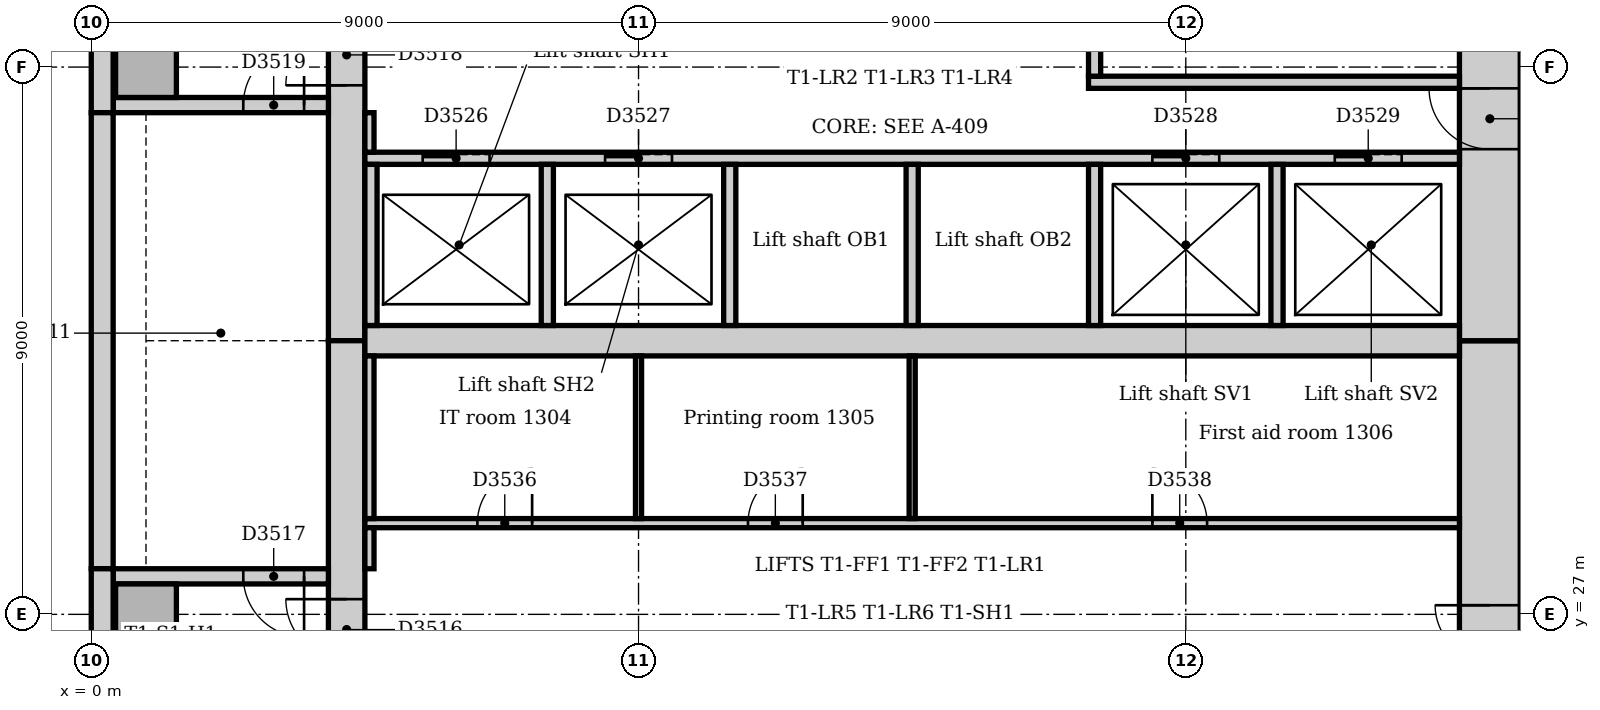
"""IFC4 building model, lengths in metres.
Left out: names, types, materials, properties, quantities, classifications, styles, units other than length and angle.
Written with IfcOpenShell. Run it as: python <this file> out.ifc"""

import sys

from ifc_helpers import new_model, si_unit, direction, frame, frame_2d, origin, origin_2d, place, context, subcontext, project, spatial, rectangle, extrude, element, fill, save


model = new_model("IFC4")
c1 = context("Model", 3, precision=1e-05, world=origin(), true_north=direction((0.0, 1.0)))
c2 = subcontext(c1, "Body", "Model", "MODEL_VIEW")
j1 = project(units=[si_unit("LENGTHUNIT", "METRE"), si_unit("PLANEANGLEUNIT", "RADIAN")], contexts=[c1])
p1 = place(None, origin())
s1 = spatial("IfcSite", under=j1, at=p1, CompositionType="ELEMENT")
p2 = place(p1, origin())
s2 = spatial("IfcBuilding", under=s1, at=p2, CompositionType="ELEMENT")
p3 = place(p2, frame((0.0, 0.0, 59.0)))
s3 = spatial("IfcBuildingStorey", under=s2, at=p3, CompositionType="ELEMENT", Elevation=59.0)
p4 = place(p3, frame((23.0, 21.0, 0.0), z_axis=(0.0, 0.0, 1.0), x_axis=(0.0, 1.0, 0.0)))
e1 = element("IfcWall", 1, at=p4, inside=s3, PredefinedType="SOLIDWALL", context=c2, shape_type="SweptSolid", body=[
    extrude(rectangle(XDim=10.5, YDim=1.0, at=frame_2d((5.25, 0.0))), origin(), (0.0, 0.0, 1.0), 4.0),
])
p5 = place(p4, frame((4.35, 0.0, 0.0)))
e2 = element("IfcOpeningElement", 2, at=p5, cuts=e1, PredefinedType="OPENING", context=c2, shape_type="SweptSolid", body=[
    extrude(rectangle(XDim=1.8, YDim=2.1, at=frame_2d((0.9, 1.05))), frame((0.0, 0.51, 0.0), z_axis=(0.0, -1.0, 0.0), x_axis=(1.0, 0.0, 0.0)), (0.0, 0.0, 1.0), 1.02),
])
p6 = place(p3, frame((23.0, 31.5, 0.0), z_axis=(0.0, 0.0, 1.0), x_axis=(0.0, 1.0, 0.0)))
e3 = element("IfcWall", 3, at=p6, inside=s3, PredefinedType="SOLIDWALL", context=c2, shape_type="SweptSolid", body=[
    extrude(rectangle(XDim=10.5, YDim=1.0, at=frame_2d((5.25, 0.0))), origin(), (0.0, 0.0, 1.0), 4.0),
])
p7 = place(p6, frame((3.15, 0.0, 0.0)))
e4 = element("IfcOpeningElement", 4, at=p7, cuts=e3, PredefinedType="OPENING", context=c2, shape_type="SweptSolid", body=[
    extrude(rectangle(XDim=1.0, YDim=2.1, at=frame_2d((0.5, 1.05))), frame((0.0, 0.51, 0.0), z_axis=(0.0, -1.0, 0.0), x_axis=(1.0, 0.0, 0.0)), (0.0, 0.0, 1.0), 1.02),
])
p8 = place(p6, frame((5.2, 0.0, 0.0)))
e5 = element("IfcOpeningElement", 5, at=p8, cuts=e3, PredefinedType="OPENING", context=c2, shape_type="SweptSolid", body=[
    extrude(rectangle(XDim=1.0, YDim=2.1, at=frame_2d((0.5, 1.05))), frame((0.0, 0.51, 0.0), z_axis=(0.0, -1.0, 0.0), x_axis=(1.0, 0.0, 0.0)), (0.0, 0.0, 1.0), 1.02),
])
p9 = place(p3, frame((4.2, 42.0, 0.0), z_axis=(0.0, 0.0, 1.0), x_axis=(0.0, -1.0, 0.0)))
e6 = element("IfcWall", 6, at=p9, inside=s3, PredefinedType="SOLIDWALL", context=c2, shape_type="SweptSolid", body=[
    extrude(rectangle(XDim=10.5, YDim=0.6, at=frame_2d((5.25, 0.0))), origin(), (0.0, 0.0, 1.0), 4.0),
])
p10 = place(p9, frame((5.3, 0.0, 0.0)))
e7 = element("IfcOpeningElement", 7, at=p10, cuts=e6, PredefinedType="OPENING", context=c2, shape_type="SweptSolid", body=[
    extrude(rectangle(XDim=1.0, YDim=2.1, at=frame_2d((0.5, 1.05))), frame((0.0, 0.31, 0.0), z_axis=(0.0, -1.0, 0.0), x_axis=(1.0, 0.0, 0.0)), (0.0, 0.0, 1.0), 0.62),
])
p11 = place(p3, frame((4.2, 31.5, 0.0), z_axis=(0.0, 0.0, 1.0), x_axis=(0.0, -1.0, 0.0)))
e8 = element("IfcWall", 8, at=p11, inside=s3, PredefinedType="SOLIDWALL", context=c2, shape_type="SweptSolid", body=[
    extrude(rectangle(XDim=10.5, YDim=0.6, at=frame_2d((5.25, 0.0))), origin(), (0.0, 0.0, 1.0), 4.0),
])
p12 = place(p11, frame((4.25, 0.0, 0.0)))
e9 = element("IfcOpeningElement", 9, at=p12, cuts=e8, PredefinedType="OPENING", context=c2, shape_type="SweptSolid", body=[
    extrude(rectangle(XDim=1.0, YDim=2.1, at=frame_2d((0.5, 1.05))), frame((0.0, 0.31, 0.0), z_axis=(0.0, -1.0, 0.0), x_axis=(1.0, 0.0, 0.0)), (0.0, 0.0, 1.0), 0.62),
])
p13 = place(p3, frame((4.5, 31.5, 0.0), z_axis=(0.0, 0.0, 1.0), x_axis=(1.0, 0.0, 0.0)))
e10 = element("IfcWall", 10, at=p13, inside=s3, PredefinedType="SOLIDWALL", context=c2, shape_type="SweptSolid", body=[
    extrude(rectangle(XDim=18.0, YDim=0.5, at=frame_2d((9.0, 0.0))), origin(), (0.0, 0.0, 1.0), 4.0),
])
p14 = place(p3, frame((3.9, 27.625, 0.0), z_axis=(0.0, 0.0, 1.0), x_axis=(-1.0, 0.0, 0.0)))
e11 = element("IfcWall", 11, at=p14, inside=s3, PredefinedType="SOLIDWALL", context=c2, shape_type="SweptSolid", body=[
    extrude(rectangle(XDim=3.54, YDim=0.25, at=frame_2d((1.77, 0.0))), origin(), (0.0, 0.0, 1.0), 4.0),
])
p15 = place(p14, frame((0.4, 0.0, 0.0)))
e12 = element("IfcOpeningElement", 12, at=p15, cuts=e11, PredefinedType="OPENING", context=c2, shape_type="SweptSolid", body=[
    extrude(rectangle(XDim=1.0, YDim=2.1, at=frame_2d((0.5, 1.05))), frame((0.0, 0.135, 0.0), z_axis=(0.0, -1.0, 0.0), x_axis=(1.0, 0.0, 0.0)), (0.0, 0.0, 1.0), 0.27),
])
p16 = place(p3, frame((0.36, 35.375, 0.0), z_axis=(0.0, 0.0, 1.0), x_axis=(1.0, 0.0, 0.0)))
e13 = element("IfcWall", 13, at=p16, inside=s3, PredefinedType="SOLIDWALL", context=c2, shape_type="SweptSolid", body=[
    extrude(rectangle(XDim=3.54, YDim=0.25, at=frame_2d((1.77, 0.0))), origin(), (0.0, 0.0, 1.0), 4.0),
])
p17 = place(p16, frame((2.14, 0.0, 0.0)))
e14 = element("IfcOpeningElement", 14, at=p17, cuts=e13, PredefinedType="OPENING", context=c2, shape_type="SweptSolid", body=[
    extrude(rectangle(XDim=1.0, YDim=2.1, at=frame_2d((0.5, 1.05))), frame((0.0, 0.135, 0.0), z_axis=(0.0, -1.0, 0.0), x_axis=(1.0, 0.0, 0.0)), (0.0, 0.0, 1.0), 0.27),
])
for number, where, z_axis, x_axis in (
    (15, (0.9, 27.0, 0.0), (0.0, 0.0, 1.0), (1.0, 0.0, 0.0)),
    (16, (0.9, 36.0, 0.0), (0.0, 0.0, 1.0), (1.0, 0.0, 0.0)),
):
    element("IfcColumn", number, at=place(p3, frame(where, z_axis=z_axis, x_axis=x_axis)), inside=s3, PredefinedType="COLUMN", context=c2, shape_type="SweptSolid", body=[
        extrude(rectangle(XDim=1.0, YDim=1.0, at=origin_2d()), origin(), (0.0, 0.0, 1.0), 4.0),
    ])
p18 = place(p3, frame((0.18, 40.757, 0.0), z_axis=(0.0, 0.0, 1.0), x_axis=(0.0, -1.0, 0.0)))
e17 = element("IfcWall", 17, at=p18, inside=s3, PredefinedType="STANDARD", context=c2, shape_type="SweptSolid", body=[
    extrude(rectangle(XDim=5.507, YDim=0.36, at=frame_2d((2.754, 0.0))), origin(), (0.0, 0.0, 1.0), 3.85),
])
p19 = place(p3, frame((0.18, 35.25, 0.0), z_axis=(0.0, 0.0, 1.0), x_axis=(0.0, -1.0, 0.0)))
e18 = element("IfcWall", 18, at=p19, inside=s3, PredefinedType="STANDARD", context=c2, shape_type="SweptSolid", body=[
    extrude(rectangle(XDim=7.5, YDim=0.36, at=frame_2d((3.75, 0.0))), origin(), (0.0, 0.0, 1.0), 3.85),
])
p20 = place(p3, frame((0.18, 27.75, 0.0), z_axis=(0.0, 0.0, 1.0), x_axis=(0.0, -1.0, 0.0)))
e19 = element("IfcWall", 19, at=p20, inside=s3, PredefinedType="STANDARD", context=c2, shape_type="SweptSolid", body=[
    extrude(rectangle(XDim=6.75, YDim=0.36, at=frame_2d((3.375, 0.0))), origin(), (0.0, 0.0, 1.0), 3.85),
])
p21 = place(p3, frame((16.4, 35.75, 0.0), z_axis=(0.0, 0.0, 1.0), x_axis=(1.0, 0.0, 0.0)))
e20 = element("IfcWall", 20, at=p21, inside=s3, PredefinedType="PARTITIONING", context=c2, shape_type="SweptSolid", body=[
    extrude(rectangle(XDim=6.1, YDim=0.2, at=frame_2d((3.05, 0.0))), origin(), (0.0, 0.0, 1.0), 3.85),
])
p22 = place(p3, frame((16.5, 35.85, 0.0), z_axis=(0.0, 0.0, 1.0), x_axis=(0.0, 1.0, 0.0)))
e21 = element("IfcWall", 21, at=p22, inside=s3, PredefinedType="PARTITIONING", context=c2, shape_type="SweptSolid", body=[
    extrude(rectangle(XDim=2.55, YDim=0.2, at=frame_2d((1.275, 0.0))), origin(), (0.0, 0.0, 1.0), 3.85),
])
p23 = place(p3, frame((4.5, 34.5, 0.0), z_axis=(0.0, 0.0, 1.0), x_axis=(1.0, 0.0, 0.0)))
e22 = element("IfcWall", 22, at=p23, inside=s3, PredefinedType="PARTITIONING", context=c2, shape_type="SweptSolid", body=[
    extrude(rectangle(XDim=18.0, YDim=0.2, at=frame_2d((9.0, 0.0))), origin(), (0.0, 0.0, 1.0), 3.85),
])
p24 = place(p23, frame((0.95, 0.0, 0.0)))
e23 = element("IfcOpeningElement", 23, at=p24, cuts=e22, PredefinedType="OPENING", context=c2, shape_type="SweptSolid", body=[
    extrude(rectangle(XDim=1.1, YDim=2.1, at=frame_2d((0.55, 1.05))), frame((0.0, 0.11, 0.0), z_axis=(0.0, -1.0, 0.0), x_axis=(1.0, 0.0, 0.0)), (0.0, 0.0, 1.0), 0.22),
])
p25 = place(p23, frame((3.95, 0.0, 0.0)))
e24 = element("IfcOpeningElement", 24, at=p25, cuts=e22, PredefinedType="OPENING", context=c2, shape_type="SweptSolid", body=[
    extrude(rectangle(XDim=1.1, YDim=2.1, at=frame_2d((0.55, 1.05))), frame((0.0, 0.11, 0.0), z_axis=(0.0, -1.0, 0.0), x_axis=(1.0, 0.0, 0.0)), (0.0, 0.0, 1.0), 0.22),
])
p26 = place(p23, frame((12.95, 0.0, 0.0)))
e25 = element("IfcOpeningElement", 25, at=p26, cuts=e22, PredefinedType="OPENING", context=c2, shape_type="SweptSolid", body=[
    extrude(rectangle(XDim=1.1, YDim=2.1, at=frame_2d((0.55, 1.05))), frame((0.0, 0.11, 0.0), z_axis=(0.0, -1.0, 0.0), x_axis=(1.0, 0.0, 0.0)), (0.0, 0.0, 1.0), 0.22),
])
p27 = place(p23, frame((15.95, 0.0, 0.0)))
e26 = element("IfcOpeningElement", 26, at=p27, cuts=e22, PredefinedType="OPENING", context=c2, shape_type="SweptSolid", body=[
    extrude(rectangle(XDim=1.1, YDim=2.1, at=frame_2d((0.55, 1.05))), frame((0.0, 0.11, 0.0), z_axis=(0.0, -1.0, 0.0), x_axis=(1.0, 0.0, 0.0)), (0.0, 0.0, 1.0), 0.22),
])
for number, where, z_axis, x_axis in (
    (27, (4.6, 31.75, 0.0), (0.0, 0.0, 1.0), (0.0, 1.0, 0.0)),
    (28, (7.5, 31.75, 0.0), (0.0, 0.0, 1.0), (0.0, 1.0, 0.0)),
    (29, (10.5, 31.75, 0.0), (0.0, 0.0, 1.0), (0.0, 1.0, 0.0)),
    (30, (13.5, 31.75, 0.0), (0.0, 0.0, 1.0), (0.0, 1.0, 0.0)),
    (31, (16.5, 31.75, 0.0), (0.0, 0.0, 1.0), (0.0, 1.0, 0.0)),
    (32, (19.5, 31.75, 0.0), (0.0, 0.0, 1.0), (0.0, 1.0, 0.0)),
):
    element("IfcWall", number, at=place(p3, frame(where, z_axis=z_axis, x_axis=x_axis)), inside=s3, PredefinedType="PARTITIONING", context=c2, shape_type="SweptSolid", body=[
        extrude(rectangle(XDim=2.65, YDim=0.2, at=frame_2d((1.325, 0.0))), origin(), (0.0, 0.0, 1.0), 3.85),
    ])
p28 = place(p3, frame((4.5, 28.5, 0.0), z_axis=(0.0, 0.0, 1.0), x_axis=(1.0, 0.0, 0.0)))
e33 = element("IfcWall", 33, at=p28, inside=s3, PredefinedType="PARTITIONING", context=c2, shape_type="SweptSolid", body=[
    extrude(rectangle(XDim=18.0, YDim=0.15, at=frame_2d((9.0, 0.0))), origin(), (0.0, 0.0, 1.0), 3.85),
])
p29 = place(p28, frame((1.85, 0.0, 0.0)))
e34 = element("IfcOpeningElement", 34, at=p29, cuts=e33, PredefinedType="OPENING", context=c2, shape_type="SweptSolid", body=[
    extrude(rectangle(XDim=0.9, YDim=2.1, at=frame_2d((0.45, 1.05))), frame((0.0, 0.085, 0.0), z_axis=(0.0, -1.0, 0.0), x_axis=(1.0, 0.0, 0.0)), (0.0, 0.0, 1.0), 0.17),
])
p30 = place(p28, frame((6.3, 0.0, 0.0)))
e35 = element("IfcOpeningElement", 35, at=p30, cuts=e33, PredefinedType="OPENING", context=c2, shape_type="SweptSolid", body=[
    extrude(rectangle(XDim=0.9, YDim=2.1, at=frame_2d((0.45, 1.05))), frame((0.0, 0.085, 0.0), z_axis=(0.0, -1.0, 0.0), x_axis=(1.0, 0.0, 0.0)), (0.0, 0.0, 1.0), 0.17),
])
p31 = place(p28, frame((12.95, 0.0, 0.0)))
e36 = element("IfcOpeningElement", 36, at=p31, cuts=e33, PredefinedType="OPENING", context=c2, shape_type="SweptSolid", body=[
    extrude(rectangle(XDim=0.9, YDim=2.1, at=frame_2d((0.45, 1.05))), frame((0.0, 0.085, 0.0), z_axis=(0.0, -1.0, 0.0), x_axis=(1.0, 0.0, 0.0)), (0.0, 0.0, 1.0), 0.17),
])
p32 = place(p3, frame((4.575, 27.75, 0.0), z_axis=(0.0, 0.0, 1.0), x_axis=(0.0, 1.0, 0.0)))
e37 = element("IfcWall", 37, at=p32, inside=s3, PredefinedType="PARTITIONING", context=c2, shape_type="SweptSolid", body=[
    extrude(rectangle(XDim=0.675, YDim=0.15, at=frame_2d((0.338, 0.0))), origin(), (0.0, 0.0, 1.0), 3.85),
])
p33 = place(p3, frame((4.575, 28.575, 0.0), z_axis=(0.0, 0.0, 1.0), x_axis=(0.0, 1.0, 0.0)))
e38 = element("IfcWall", 38, at=p33, inside=s3, PredefinedType="PARTITIONING", context=c2, shape_type="SweptSolid", body=[
    extrude(rectangle(XDim=2.675, YDim=0.15, at=frame_2d((1.337, 0.0))), origin(), (0.0, 0.0, 1.0), 3.85),
])
p34 = place(p3, frame((4.575, 34.6, 0.0), z_axis=(0.0, 0.0, 1.0), x_axis=(0.0, 1.0, 0.0)))
e39 = element("IfcWall", 39, at=p34, inside=s3, PredefinedType="PARTITIONING", context=c2, shape_type="SweptSolid", body=[
    extrude(rectangle(XDim=0.65, YDim=0.15, at=frame_2d((0.325, 0.0))), origin(), (0.0, 0.0, 1.0), 3.85),
])
for number, where, z_axis, x_axis in (
    (40, (9.0, 28.575, 0.0), (0.0, 0.0, 1.0), (0.0, 1.0, 0.0)),
    (41, (13.5, 28.575, 0.0), (0.0, 0.0, 1.0), (0.0, 1.0, 0.0)),
):
    element("IfcWall", number, at=place(p3, frame(where, z_axis=z_axis, x_axis=x_axis)), inside=s3, PredefinedType="PARTITIONING", context=c2, shape_type="SweptSolid", body=[
        extrude(rectangle(XDim=2.675, YDim=0.1, at=frame_2d((1.337, 0.0))), origin(), (0.0, 0.0, 1.0), 3.85),
    ])
p35 = place(p12, frame((1.0, 0.0, 0.0), z_axis=(0.0, 0.0, 1.0), x_axis=(-1.0, 0.0, 0.0)))
e42 = element("IfcDoor", 42, at=p35, inside=s3, OperationType="SINGLE_SWING_RIGHT", PredefinedType="DOOR", context=c2, shape_type="SweptSolid", body=[
    extrude(rectangle(XDim=1.0, YDim=2.1, at=frame_2d((0.5, 1.05))), frame((0.0, 0.025, 0.0), z_axis=(0.0, -1.0, 0.0), x_axis=(1.0, 0.0, 0.0)), (0.0, 0.0, 1.0), 0.05),
])
fill(e9, e42)
p36 = place(p15, origin())
e43 = element("IfcDoor", 43, at=p36, inside=s3, OperationType="SINGLE_SWING_LEFT", PredefinedType="DOOR", context=c2, shape_type="SweptSolid", body=[
    extrude(rectangle(XDim=1.0, YDim=2.1, at=frame_2d((0.5, 1.05))), frame((0.0, 0.025, 0.0), z_axis=(0.0, -1.0, 0.0), x_axis=(1.0, 0.0, 0.0)), (0.0, 0.0, 1.0), 0.05),
])
fill(e12, e43)
p37 = place(p10, frame((1.0, 0.0, 0.0), z_axis=(0.0, 0.0, 1.0), x_axis=(-1.0, 0.0, 0.0)))
e44 = element("IfcDoor", 44, at=p37, inside=s3, OperationType="SINGLE_SWING_LEFT", PredefinedType="DOOR", context=c2, shape_type="SweptSolid", body=[
    extrude(rectangle(XDim=1.0, YDim=2.1, at=frame_2d((0.5, 1.05))), frame((0.0, 0.025, 0.0), z_axis=(0.0, -1.0, 0.0), x_axis=(1.0, 0.0, 0.0)), (0.0, 0.0, 1.0), 0.05),
])
fill(e7, e44)
p38 = place(p17, origin())
e45 = element("IfcDoor", 45, at=p38, inside=s3, OperationType="SINGLE_SWING_RIGHT", PredefinedType="DOOR", context=c2, shape_type="SweptSolid", body=[
    extrude(rectangle(XDim=1.0, YDim=2.1, at=frame_2d((0.5, 1.05))), frame((0.0, 0.025, 0.0), z_axis=(0.0, -1.0, 0.0), x_axis=(1.0, 0.0, 0.0)), (0.0, 0.0, 1.0), 0.05),
])
fill(e14, e45)
p39 = place(p24, origin())
e46 = element("IfcDoor", 46, at=p39, inside=s3, OperationType="SLIDING_TO_LEFT", PredefinedType="DOOR", context=c2, shape_type="SweptSolid", body=[
    extrude(rectangle(XDim=1.1, YDim=2.1, at=frame_2d((0.55, 1.05))), frame((0.0, 0.025, 0.0), z_axis=(0.0, -1.0, 0.0), x_axis=(1.0, 0.0, 0.0)), (0.0, 0.0, 1.0), 0.05),
])
fill(e23, e46)
p40 = place(p25, origin())
e47 = element("IfcDoor", 47, at=p40, inside=s3, OperationType="SLIDING_TO_LEFT", PredefinedType="DOOR", context=c2, shape_type="SweptSolid", body=[
    extrude(rectangle(XDim=1.1, YDim=2.1, at=frame_2d((0.55, 1.05))), frame((0.0, 0.025, 0.0), z_axis=(0.0, -1.0, 0.0), x_axis=(1.0, 0.0, 0.0)), (0.0, 0.0, 1.0), 0.05),
])
fill(e24, e47)
p41 = place(p26, origin())
e48 = element("IfcDoor", 48, at=p41, inside=s3, OperationType="SLIDING_TO_LEFT", PredefinedType="DOOR", context=c2, shape_type="SweptSolid", body=[
    extrude(rectangle(XDim=1.1, YDim=2.1, at=frame_2d((0.55, 1.05))), frame((0.0, 0.025, 0.0), z_axis=(0.0, -1.0, 0.0), x_axis=(1.0, 0.0, 0.0)), (0.0, 0.0, 1.0), 0.05),
])
fill(e25, e48)
p42 = place(p27, origin())
e49 = element("IfcDoor", 49, at=p42, inside=s3, OperationType="SLIDING_TO_LEFT", PredefinedType="DOOR", context=c2, shape_type="SweptSolid", body=[
    extrude(rectangle(XDim=1.1, YDim=2.1, at=frame_2d((0.55, 1.05))), frame((0.0, 0.025, 0.0), z_axis=(0.0, -1.0, 0.0), x_axis=(1.0, 0.0, 0.0)), (0.0, 0.0, 1.0), 0.05),
])
fill(e26, e49)
p43 = place(p5, origin())
e50 = element("IfcDoor", 50, at=p43, inside=s3, OperationType="DOUBLE_DOOR_DOUBLE_SWING", PredefinedType="DOOR", context=c2, shape_type="SweptSolid", body=[
    extrude(rectangle(XDim=1.8, YDim=2.1, at=frame_2d((0.9, 1.05))), frame((0.0, 0.025, 0.0), z_axis=(0.0, -1.0, 0.0), x_axis=(1.0, 0.0, 0.0)), (0.0, 0.0, 1.0), 0.05),
])
fill(e2, e50)
p44 = place(p7, origin())
e51 = element("IfcDoor", 51, at=p44, inside=s3, OperationType="SINGLE_SWING_RIGHT", PredefinedType="DOOR", context=c2, shape_type="SweptSolid", body=[
    extrude(rectangle(XDim=1.0, YDim=2.1, at=frame_2d((0.5, 1.05))), frame((0.0, 0.025, 0.0), z_axis=(0.0, -1.0, 0.0), x_axis=(1.0, 0.0, 0.0)), (0.0, 0.0, 1.0), 0.05),
])
fill(e4, e51)
p45 = place(p29, origin())
e52 = element("IfcDoor", 52, at=p45, inside=s3, OperationType="SINGLE_SWING_RIGHT", PredefinedType="DOOR", context=c2, shape_type="SweptSolid", body=[
    extrude(rectangle(XDim=0.9, YDim=2.1, at=frame_2d((0.45, 1.05))), frame((0.0, 0.025, 0.0), z_axis=(0.0, -1.0, 0.0), x_axis=(1.0, 0.0, 0.0)), (0.0, 0.0, 1.0), 0.05),
])
fill(e34, e52)
p46 = place(p30, origin())
e53 = element("IfcDoor", 53, at=p46, inside=s3, OperationType="SINGLE_SWING_RIGHT", PredefinedType="DOOR", context=c2, shape_type="SweptSolid", body=[
    extrude(rectangle(XDim=0.9, YDim=2.1, at=frame_2d((0.45, 1.05))), frame((0.0, 0.025, 0.0), z_axis=(0.0, -1.0, 0.0), x_axis=(1.0, 0.0, 0.0)), (0.0, 0.0, 1.0), 0.05),
])
fill(e35, e53)
p47 = place(p31, origin())
e54 = element("IfcDoor", 54, at=p47, inside=s3, OperationType="SINGLE_SWING_LEFT", PredefinedType="DOOR", context=c2, shape_type="SweptSolid", body=[
    extrude(rectangle(XDim=0.9, YDim=2.1, at=frame_2d((0.45, 1.05))), frame((0.0, 0.025, 0.0), z_axis=(0.0, -1.0, 0.0), x_axis=(1.0, 0.0, 0.0)), (0.0, 0.0, 1.0), 0.05),
])
fill(e36, e54)
save(model, sys.argv[1])
